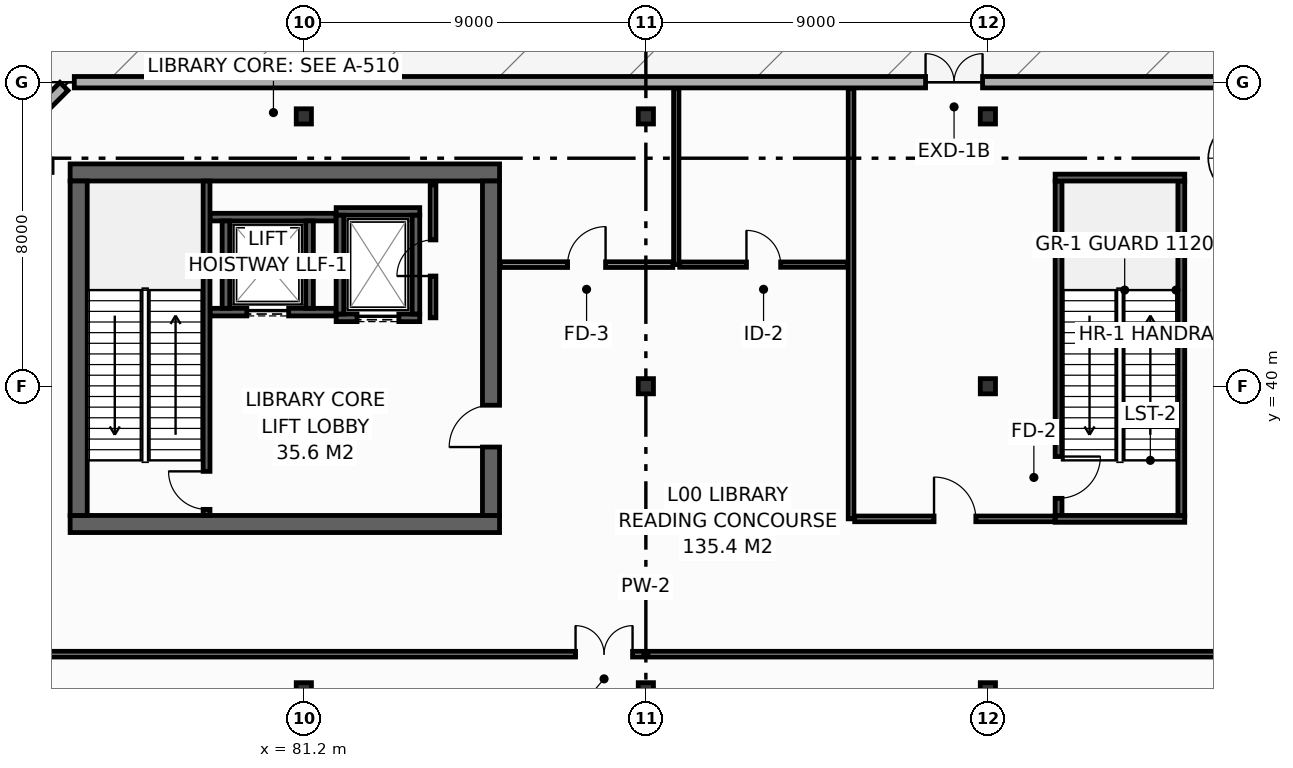
"""IFC4 building model, lengths in metres.
Left out: names, types, materials, properties, quantities, classifications, styles, units other than length and angle.
Written with IfcOpenShell. Run it as: python <this file> out.ifc"""

import sys

from ifc_helpers import new_model, si_unit, direction, frame, frame_2d, origin, origin_2d, place, context, subcontext, project, spatial, rectangle, i_section, extrude, element, fill, save


model = new_model("IFC4")
c1 = context("Model", 3, precision=1e-05, world=origin(), true_north=direction((0.0, 1.0)))
c2 = subcontext(c1, "Body", "Model", "MODEL_VIEW")
j1 = project(units=[si_unit("LENGTHUNIT", "METRE"), si_unit("PLANEANGLEUNIT", "RADIAN")], contexts=[c1])
p1 = place(None, origin())
s1 = spatial("IfcSite", under=j1, at=p1, CompositionType="ELEMENT")
p2 = place(p1, origin())
s2 = spatial("IfcBuilding", under=s1, at=p2, CompositionType="ELEMENT")
p3 = place(p2, origin())
s3 = spatial("IfcBuildingStorey", under=s2, at=p3, CompositionType="ELEMENT", Elevation=0.0)
for number, where, z_axis, x_axis in (
    (1, (75.05, 36.375, 0.0), (0.0, 0.0, 1.0), (1.0, 0.0, 0.0)),
    (2, (75.05, 45.625, 0.0), (0.0, 0.0, 1.0), (1.0, 0.0, 0.0)),
):
    element("IfcWall", number, at=place(p3, frame(where, z_axis=z_axis, x_axis=x_axis)), inside=s3, PredefinedType="SHEAR", context=c2, shape_type="SweptSolid", body=[
        extrude(rectangle(XDim=11.3, YDim=0.45, at=frame_2d((5.65, 0.0))), origin(), (0.0, 0.0, 1.0), 5.7),
    ])
p4 = place(p3, frame((75.275, 36.6, 0.0), z_axis=(0.0, 0.0, 1.0), x_axis=(0.0, 1.0, 0.0)))
e3 = element("IfcWall", 3, at=p4, inside=s3, PredefinedType="SHEAR", context=c2, shape_type="SweptSolid", body=[
    extrude(rectangle(XDim=8.8, YDim=0.45, at=frame_2d((4.4, 0.0))), origin(), (0.0, 0.0, 1.0), 5.7),
])
p5 = place(p3, frame((86.125, 36.6, 0.0), z_axis=(0.0, 0.0, 1.0), x_axis=(0.0, 1.0, 0.0)))
e4 = element("IfcWall", 4, at=p5, inside=s3, PredefinedType="SHEAR", context=c2, shape_type="SweptSolid", body=[
    extrude(rectangle(XDim=8.8, YDim=0.45, at=frame_2d((4.4, 0.0))), origin(), (0.0, 0.0, 1.0), 5.7),
])
p6 = place(p5, frame((1.8, 0.0, 0.0)))
e5 = element("IfcOpeningElement", 5, at=p6, cuts=e4, PredefinedType="OPENING", context=c2, shape_type="SweptSolid", body=[
    extrude(rectangle(XDim=1.1, YDim=2.15, at=frame_2d((0.55, 1.075))), frame((0.0, 0.235, 0.0), z_axis=(0.0, -1.0, 0.0), x_axis=(1.0, 0.0, 0.0)), (0.0, 0.0, 1.0), 0.47),
])
for number, where, z_axis, x_axis in (
    (6, (81.2, 32.0, 0.0), (0.0, 0.0, 1.0), (1.0, 0.0, 0.0)),
    (7, (81.2, 47.1, 0.0), (0.0, 0.0, 1.0), (1.0, 0.0, 0.0)),
    (8, (90.2, 32.0, 0.0), (0.0, 0.0, 1.0), (1.0, 0.0, 0.0)),
    (9, (90.2, 40.0, 0.0), (0.0, 0.0, 1.0), (1.0, 0.0, 0.0)),
    (10, (90.2, 47.1, 0.0), (0.0, 0.0, 1.0), (1.0, 0.0, 0.0)),
    (11, (99.2, 32.0, 0.0), (0.0, 0.0, 1.0), (1.0, 0.0, 0.0)),
    (12, (99.2, 40.0, 0.0), (0.0, 0.0, 1.0), (1.0, 0.0, 0.0)),
    (13, (99.2, 47.1, 0.0), (0.0, 0.0, 1.0), (1.0, 0.0, 0.0)),
):
    element("IfcColumn", number, at=place(p3, frame(where, z_axis=z_axis, x_axis=x_axis)), inside=s3, PredefinedType="COLUMN", context=c2, shape_type="SweptSolid", body=[
        extrude(i_section(OverallWidth=0.4, OverallDepth=0.4, WebThickness=0.013, FlangeThickness=0.021, FilletRadius=0.022, at=origin_2d()), origin(), (0.0, 0.0, 1.0), 6.0),
    ])
p7 = place(p3, frame((78.73, 41.95, 0.0), z_axis=(0.0, 0.0, 1.0), x_axis=(1.0, 0.0, 0.0)))
e14 = element("IfcWall", 14, at=p7, inside=s3, PredefinedType="SHEAR", context=c2, shape_type="SweptSolid", body=[
    extrude(rectangle(XDim=3.32, YDim=0.2, at=frame_2d((1.66, 0.0))), origin(), (0.0, 0.0, 1.0), 5.7),
])
p8 = place(p7, frame((0.97, 0.0, 0.0)))
e15 = element("IfcOpeningElement", 15, at=p8, cuts=e14, PredefinedType="OPENING", context=c2, shape_type="SweptSolid", body=[
    extrude(rectangle(XDim=1.1, YDim=2.2, at=frame_2d((0.55, 1.1))), frame((0.0, 0.11, 0.0), z_axis=(0.0, -1.0, 0.0), x_axis=(1.0, 0.0, 0.0)), (0.0, 0.0, 1.0), 0.22),
])
p9 = place(p3, frame((78.73, 44.45, 0.0), z_axis=(0.0, 0.0, 1.0), x_axis=(1.0, 0.0, 0.0)))
e16 = element("IfcWall", 16, at=p9, inside=s3, PredefinedType="SHEAR", context=c2, shape_type="SweptSolid", body=[
    extrude(rectangle(XDim=3.32, YDim=0.2, at=frame_2d((1.66, 0.0))), origin(), (0.0, 0.0, 1.0), 5.7),
])
for number, where, z_axis, x_axis in (
    (17, (79.15, 42.05, 0.0), (0.0, 0.0, 1.0), (0.0, 1.0, 0.0)),
    (18, (81.35, 42.05, 0.0), (0.0, 0.0, 1.0), (0.0, 1.0, 0.0)),
):
    element("IfcWall", number, at=place(p3, frame(where, z_axis=z_axis, x_axis=x_axis)), inside=s3, PredefinedType="SHEAR", context=c2, shape_type="SweptSolid", body=[
        extrude(rectangle(XDim=2.3, YDim=0.2, at=frame_2d((1.15, 0.0))), origin(), (0.0, 0.0, 1.0), 5.7),
    ])
p10 = place(p3, frame((82.05, 41.8, 0.0), z_axis=(0.0, 0.0, 1.0), x_axis=(1.0, 0.0, 0.0)))
e19 = element("IfcWall", 19, at=p10, inside=s3, PredefinedType="SHEAR", context=c2, shape_type="SweptSolid", body=[
    extrude(rectangle(XDim=2.2, YDim=0.2, at=frame_2d((1.1, 0.0))), origin(), (0.0, 0.0, 1.0), 5.7),
])
p11 = place(p10, frame((0.55, 0.0, 0.0)))
e20 = element("IfcOpeningElement", 20, at=p11, cuts=e19, PredefinedType="OPENING", context=c2, shape_type="SweptSolid", body=[
    extrude(rectangle(XDim=1.1, YDim=2.2, at=frame_2d((0.55, 1.1))), frame((0.0, 0.11, 0.0), z_axis=(0.0, -1.0, 0.0), x_axis=(1.0, 0.0, 0.0)), (0.0, 0.0, 1.0), 0.22),
])
p12 = place(p3, frame((82.05, 44.6, 0.0), z_axis=(0.0, 0.0, 1.0), x_axis=(1.0, 0.0, 0.0)))
e21 = element("IfcWall", 21, at=p12, inside=s3, PredefinedType="SHEAR", context=c2, shape_type="SweptSolid", body=[
    extrude(rectangle(XDim=2.2, YDim=0.2, at=frame_2d((1.1, 0.0))), origin(), (0.0, 0.0, 1.0), 5.7),
])
for number, where, z_axis, x_axis in (
    (22, (82.15, 41.9, 0.0), (0.0, 0.0, 1.0), (0.0, 1.0, 0.0)),
    (23, (84.15, 41.9, 0.0), (0.0, 0.0, 1.0), (0.0, 1.0, 0.0)),
):
    element("IfcWall", number, at=place(p3, frame(where, z_axis=z_axis, x_axis=x_axis)), inside=s3, PredefinedType="SHEAR", context=c2, shape_type="SweptSolid", body=[
        extrude(rectangle(XDim=2.6, YDim=0.2, at=frame_2d((1.3, 0.0))), origin(), (0.0, 0.0, 1.0), 5.7),
    ])
p13 = place(p3, frame((78.64, 36.6, 0.0), z_axis=(0.0, 0.0, 1.0), x_axis=(0.0, 1.0, 0.0)))
e24 = element("IfcWall", 24, at=p13, inside=s3, PredefinedType="SHEAR", context=c2, shape_type="SweptSolid", body=[
    extrude(rectangle(XDim=8.8, YDim=0.18, at=frame_2d((4.4, 0.0))), origin(), (0.0, 0.0, 1.0), 5.7),
])
p14 = place(p13, frame((0.16, 0.0, 0.0)))
e25 = element("IfcOpeningElement", 25, at=p14, cuts=e24, PredefinedType="OPENING", context=c2, shape_type="SweptSolid", body=[
    extrude(rectangle(XDim=1.0, YDim=2.15, at=frame_2d((0.5, 1.075))), frame((0.0, 0.1, 0.0), z_axis=(0.0, -1.0, 0.0), x_axis=(1.0, 0.0, 0.0)), (0.0, 0.0, 1.0), 0.2),
])
p15 = place(p3, frame((101.06, 45.4, 0.0), z_axis=(0.0, 0.0, 1.0), x_axis=(0.0, -1.0, 0.0)))
e26 = element("IfcWall", 26, at=p15, inside=s3, PredefinedType="SHEAR", context=c2, shape_type="SweptSolid", body=[
    extrude(rectangle(XDim=8.8, YDim=0.18, at=frame_2d((4.4, 0.0))), origin(), (0.0, 0.0, 1.0), 5.7),
])
p16 = place(p15, frame((7.25, 0.0, 0.0)))
e27 = element("IfcOpeningElement", 27, at=p16, cuts=e26, PredefinedType="OPENING", context=c2, shape_type="SweptSolid", body=[
    extrude(rectangle(XDim=1.1, YDim=2.15, at=frame_2d((0.55, 1.075))), frame((0.0, 0.1, 0.0), z_axis=(0.0, -1.0, 0.0), x_axis=(1.0, 0.0, 0.0)), (0.0, 0.0, 1.0), 0.2),
])
p17 = place(p3, frame((100.97, 36.51, 0.0), z_axis=(0.0, 0.0, 1.0), x_axis=(1.0, 0.0, 0.0)))
e28 = element("IfcWall", 28, at=p17, inside=s3, PredefinedType="SHEAR", context=c2, shape_type="SweptSolid", body=[
    extrude(rectangle(XDim=3.41, YDim=0.18, at=frame_2d((1.705, 0.0))), origin(), (0.0, 0.0, 1.0), 5.7),
])
p18 = place(p3, frame((104.29, 36.6, 0.0), z_axis=(0.0, 0.0, 1.0), x_axis=(0.0, 1.0, 0.0)))
e29 = element("IfcWall", 29, at=p18, inside=s3, PredefinedType="SHEAR", context=c2, shape_type="SweptSolid", body=[
    extrude(rectangle(XDim=8.8, YDim=0.18, at=frame_2d((4.4, 0.0))), origin(), (0.0, 0.0, 1.0), 5.7),
])
p19 = place(p3, frame((104.38, 45.49, 0.0), z_axis=(0.0, 0.0, 1.0), x_axis=(-1.0, 0.0, 0.0)))
e30 = element("IfcWall", 30, at=p19, inside=s3, PredefinedType="SHEAR", context=c2, shape_type="SweptSolid", body=[
    extrude(rectangle(XDim=3.41, YDim=0.18, at=frame_2d((1.705, 0.0))), origin(), (0.0, 0.0, 1.0), 5.7),
])
p20 = place(p3, frame((84.6, 41.8, 0.0), z_axis=(0.0, 0.0, 1.0), x_axis=(0.0, 1.0, 0.0)))
e31 = element("IfcWall", 31, at=p20, inside=s3, PredefinedType="PARTITIONING", context=c2, shape_type="SweptSolid", body=[
    extrude(rectangle(XDim=3.5, YDim=0.15, at=frame_2d((1.75, 0.0))), origin(), (0.0, 0.0, 1.0), 5.7),
])
p21 = place(p20, frame((1.1, 0.0, 0.0)))
e32 = element("IfcOpeningElement", 32, at=p21, cuts=e31, PredefinedType="OPENING", context=c2, shape_type="SweptSolid", body=[
    extrude(rectangle(XDim=0.95, YDim=2.15, at=frame_2d((0.475, 1.075))), frame((0.0, 0.085, 0.0), z_axis=(0.0, -1.0, 0.0), x_axis=(1.0, 0.0, 0.0)), (0.0, 0.0, 1.0), 0.17),
])
p22 = place(p3, frame((75.16, 48.0, 0.0), z_axis=(0.0, 0.0, 1.0), x_axis=(1.0, 0.0, 0.0)))
e33 = element("IfcWall", 33, at=p22, inside=s3, PredefinedType="STANDARD", context=c2, shape_type="SweptSolid", body=[
    extrude(rectangle(XDim=30.08, YDim=0.3, at=frame_2d((15.04, 0.0))), origin(), (0.0, 0.0, 1.0), 5.7),
])
p23 = place(p22, frame((22.4, 0.0, 0.0)))
e34 = element("IfcOpeningElement", 34, at=p23, cuts=e33, PredefinedType="OPENING", context=c2, shape_type="SweptSolid", body=[
    extrude(rectangle(XDim=1.5, YDim=2.35, at=frame_2d((0.75, 1.175))), frame((0.0, 0.16, 0.0), z_axis=(0.0, -1.0, 0.0), x_axis=(1.0, 0.0, 0.0)), (0.0, 0.0, 1.0), 0.32),
])
p24 = place(p3, frame((72.313, 45.313, 0.0), z_axis=(0.0, 0.0, 1.0), x_axis=(0.707106781187, 0.707106781187, 0.0)))
e35 = element("IfcWall", 35, at=p24, inside=s3, PredefinedType="STANDARD", context=c2, shape_type="SweptSolid", body=[
    extrude(rectangle(XDim=3.64, YDim=0.3, at=frame_2d((1.82, 0.0))), origin(), (0.0, 0.0, 1.0), 5.7),
])
p25 = place(p3, frame((72.37, 32.95, 0.0), z_axis=(0.0, 0.0, 1.0), x_axis=(1.0, 0.0, 0.0)))
e36 = element("IfcWall", 36, at=p25, inside=s3, PredefinedType="PARTITIONING", context=c2, shape_type="SweptSolid", body=[
    extrude(rectangle(XDim=35.66, YDim=0.15, at=frame_2d((17.83, 0.0))), origin(), (0.0, 0.0, 1.0), 4.985),
])
p26 = place(p25, frame((15.98, 0.0, 0.0)))
e37 = element("IfcOpeningElement", 37, at=p26, cuts=e36, PredefinedType="OPENING", context=c2, shape_type="SweptSolid", body=[
    extrude(rectangle(XDim=1.5, YDim=2.2, at=frame_2d((0.75, 1.1))), frame((0.0, 0.085, 0.0), z_axis=(0.0, -1.0, 0.0), x_axis=(1.0, 0.0, 0.0)), (0.0, 0.0, 1.0), 0.17),
])
p27 = place(p3, frame((91.0, 43.2, 0.0), z_axis=(0.0, 0.0, 1.0), x_axis=(0.0, 1.0, 0.0)))
e38 = element("IfcWall", 38, at=p27, inside=s3, PredefinedType="PARTITIONING", context=c2, shape_type="SweptSolid", body=[
    extrude(rectangle(XDim=4.63, YDim=0.14, at=frame_2d((2.315, 0.0))), origin(), (0.0, 0.0, 1.0), 4.985),
])
p28 = place(p3, frame((95.6, 36.51, 0.0), z_axis=(0.0, 0.0, 1.0), x_axis=(0.0, 1.0, 0.0)))
e39 = element("IfcWall", 39, at=p28, inside=s3, PredefinedType="PARTITIONING", context=c2, shape_type="SweptSolid", body=[
    extrude(rectangle(XDim=11.32, YDim=0.15, at=frame_2d((5.66, 0.0))), origin(), (0.0, 0.0, 1.0), 4.985),
])
p29 = place(p3, frame((95.695, 36.51, 0.0), z_axis=(0.0, 0.0, 1.0), x_axis=(1.0, 0.0, 0.0)))
e40 = element("IfcWall", 40, at=p29, inside=s3, PredefinedType="PARTITIONING", context=c2, shape_type="SweptSolid", body=[
    extrude(rectangle(XDim=5.275, YDim=0.15, at=frame_2d((2.637, 0.0))), origin(), (0.0, 0.0, 1.0), 4.985),
])
p30 = place(p29, frame((2.088, 0.0, 0.0)))
e41 = element("IfcOpeningElement", 41, at=p30, cuts=e40, PredefinedType="OPENING", context=c2, shape_type="SweptSolid", body=[
    extrude(rectangle(XDim=1.1, YDim=2.15, at=frame_2d((0.55, 1.075))), frame((0.0, 0.085, 0.0), z_axis=(0.0, -1.0, 0.0), x_axis=(1.0, 0.0, 0.0)), (0.0, 0.0, 1.0), 0.17),
])
p31 = place(p3, frame((86.37, 43.2, 0.0), z_axis=(0.0, 0.0, 1.0), x_axis=(1.0, 0.0, 0.0)))
e42 = element("IfcWall", 42, at=p31, inside=s3, PredefinedType="PARTITIONING", context=c2, shape_type="SweptSolid", body=[
    extrude(rectangle(XDim=4.54, YDim=0.15, at=frame_2d((2.27, 0.0))), origin(), (0.0, 0.0, 1.0), 4.985),
])
p32 = place(p31, frame((1.77, 0.0, 0.0)))
e43 = element("IfcOpeningElement", 43, at=p32, cuts=e42, PredefinedType="OPENING", context=c2, shape_type="SweptSolid", body=[
    extrude(rectangle(XDim=1.0, YDim=2.15, at=frame_2d((0.5, 1.075))), frame((0.0, 0.085, 0.0), z_axis=(0.0, -1.0, 0.0), x_axis=(1.0, 0.0, 0.0)), (0.0, 0.0, 1.0), 0.17),
])
p33 = place(p3, frame((91.09, 43.2, 0.0), z_axis=(0.0, 0.0, 1.0), x_axis=(1.0, 0.0, 0.0)))
e44 = element("IfcWall", 44, at=p33, inside=s3, PredefinedType="PARTITIONING", context=c2, shape_type="SweptSolid", body=[
    extrude(rectangle(XDim=4.415, YDim=0.14, at=frame_2d((2.208, 0.0))), origin(), (0.0, 0.0, 1.0), 5.7),
])
p34 = place(p33, frame((1.757, 0.0, 0.0)))
e45 = element("IfcOpeningElement", 45, at=p34, cuts=e44, PredefinedType="OPENING", context=c2, shape_type="SweptSolid", body=[
    extrude(rectangle(XDim=0.9, YDim=2.1, at=frame_2d((0.45, 1.05))), frame((0.0, 0.08, 0.0), z_axis=(0.0, -1.0, 0.0), x_axis=(1.0, 0.0, 0.0)), (0.0, 0.0, 1.0), 0.16),
])
p35 = place(p8, origin())
e46 = element("IfcDoor", 46, at=p35, inside=s3, OperationType="SLIDING_TO_LEFT", PredefinedType="DOOR", context=c2, shape_type="SweptSolid", body=[
    extrude(rectangle(XDim=1.1, YDim=2.2, at=frame_2d((0.55, 1.1))), frame((0.0, 0.025, 0.0), z_axis=(0.0, -1.0, 0.0), x_axis=(1.0, 0.0, 0.0)), (0.0, 0.0, 1.0), 0.05),
])
fill(e15, e46)
p36 = place(p11, origin())
e47 = element("IfcDoor", 47, at=p36, inside=s3, OperationType="SLIDING_TO_LEFT", PredefinedType="DOOR", context=c2, shape_type="SweptSolid", body=[
    extrude(rectangle(XDim=1.1, YDim=2.2, at=frame_2d((0.55, 1.1))), frame((0.0, 0.025, 0.0), z_axis=(0.0, -1.0, 0.0), x_axis=(1.0, 0.0, 0.0)), (0.0, 0.0, 1.0), 0.05),
])
fill(e20, e47)
p37 = place(p14, origin())
e48 = element("IfcDoor", 48, at=p37, inside=s3, OperationType="SINGLE_SWING_RIGHT", PredefinedType="DOOR", context=c2, shape_type="SweptSolid", body=[
    extrude(rectangle(XDim=1.0, YDim=2.15, at=frame_2d((0.5, 1.075))), frame((0.0, 0.025, 0.0), z_axis=(0.0, -1.0, 0.0), x_axis=(1.0, 0.0, 0.0)), (0.0, 0.0, 1.0), 0.05),
])
fill(e25, e48)
p38 = place(p16, origin())
e49 = element("IfcDoor", 49, at=p38, inside=s3, OperationType="SINGLE_SWING_LEFT", PredefinedType="DOOR", context=c2, shape_type="SweptSolid", body=[
    extrude(rectangle(XDim=1.1, YDim=2.15, at=frame_2d((0.55, 1.075))), frame((0.0, 0.025, 0.0), z_axis=(0.0, -1.0, 0.0), x_axis=(1.0, 0.0, 0.0)), (0.0, 0.0, 1.0), 0.05),
])
fill(e27, e49)
p39 = place(p6, origin())
e50 = element("IfcDoor", 50, at=p39, inside=s3, OperationType="SINGLE_SWING_LEFT", PredefinedType="DOOR", context=c2, shape_type="SweptSolid", body=[
    extrude(rectangle(XDim=1.1, YDim=2.15, at=frame_2d((0.55, 1.075))), frame((0.0, 0.025, 0.0), z_axis=(0.0, -1.0, 0.0), x_axis=(1.0, 0.0, 0.0)), (0.0, 0.0, 1.0), 0.05),
])
fill(e5, e50)
p40 = place(p21, origin())
e51 = element("IfcDoor", 51, at=p40, inside=s3, OperationType="SINGLE_SWING_LEFT", PredefinedType="DOOR", context=c2, shape_type="SweptSolid", body=[
    extrude(rectangle(XDim=0.95, YDim=2.15, at=frame_2d((0.475, 1.075))), frame((0.0, 0.025, 0.0), z_axis=(0.0, -1.0, 0.0), x_axis=(1.0, 0.0, 0.0)), (0.0, 0.0, 1.0), 0.05),
])
fill(e32, e51)
p41 = place(p23, origin())
e52 = element("IfcDoor", 52, at=p41, inside=s3, OperationType="DOUBLE_DOOR_SINGLE_SWING", PredefinedType="DOOR", context=c2, shape_type="SweptSolid", body=[
    extrude(rectangle(XDim=1.5, YDim=2.35, at=frame_2d((0.75, 1.175))), frame((0.0, 0.025, 0.0), z_axis=(0.0, -1.0, 0.0), x_axis=(1.0, 0.0, 0.0)), (0.0, 0.0, 1.0), 0.05),
])
fill(e34, e52)
p42 = place(p26, origin())
e53 = element("IfcDoor", 53, at=p42, inside=s3, OperationType="DOUBLE_DOOR_SINGLE_SWING", PredefinedType="DOOR", context=c2, shape_type="SweptSolid", body=[
    extrude(rectangle(XDim=1.5, YDim=2.2, at=frame_2d((0.75, 1.1))), frame((0.0, 0.025, 0.0), z_axis=(0.0, -1.0, 0.0), x_axis=(1.0, 0.0, 0.0)), (0.0, 0.0, 1.0), 0.05),
])
fill(e37, e53)
p43 = place(p30, origin())
e54 = element("IfcDoor", 54, at=p43, inside=s3, OperationType="SINGLE_SWING_LEFT", PredefinedType="DOOR", context=c2, shape_type="SweptSolid", body=[
    extrude(rectangle(XDim=1.1, YDim=2.15, at=frame_2d((0.55, 1.075))), frame((0.0, 0.025, 0.0), z_axis=(0.0, -1.0, 0.0), x_axis=(1.0, 0.0, 0.0)), (0.0, 0.0, 1.0), 0.05),
])
fill(e41, e54)
p44 = place(p32, origin())
e55 = element("IfcDoor", 55, at=p44, inside=s3, OperationType="SINGLE_SWING_RIGHT", PredefinedType="DOOR", context=c2, shape_type="SweptSolid", body=[
    extrude(rectangle(XDim=1.0, YDim=2.15, at=frame_2d((0.5, 1.075))), frame((0.0, 0.025, 0.0), z_axis=(0.0, -1.0, 0.0), x_axis=(1.0, 0.0, 0.0)), (0.0, 0.0, 1.0), 0.05),
])
fill(e43, e55)
p45 = place(p34, origin())
e56 = element("IfcDoor", 56, at=p45, inside=s3, OperationType="SINGLE_SWING_LEFT", PredefinedType="DOOR", context=c2, shape_type="SweptSolid", body=[
    extrude(rectangle(XDim=0.9, YDim=2.1, at=frame_2d((0.45, 1.05))), frame((0.0, 0.025, 0.0), z_axis=(0.0, -1.0, 0.0), x_axis=(1.0, 0.0, 0.0)), (0.0, 0.0, 1.0), 0.05),
])
fill(e45, e56)
save(model, sys.argv[1])
